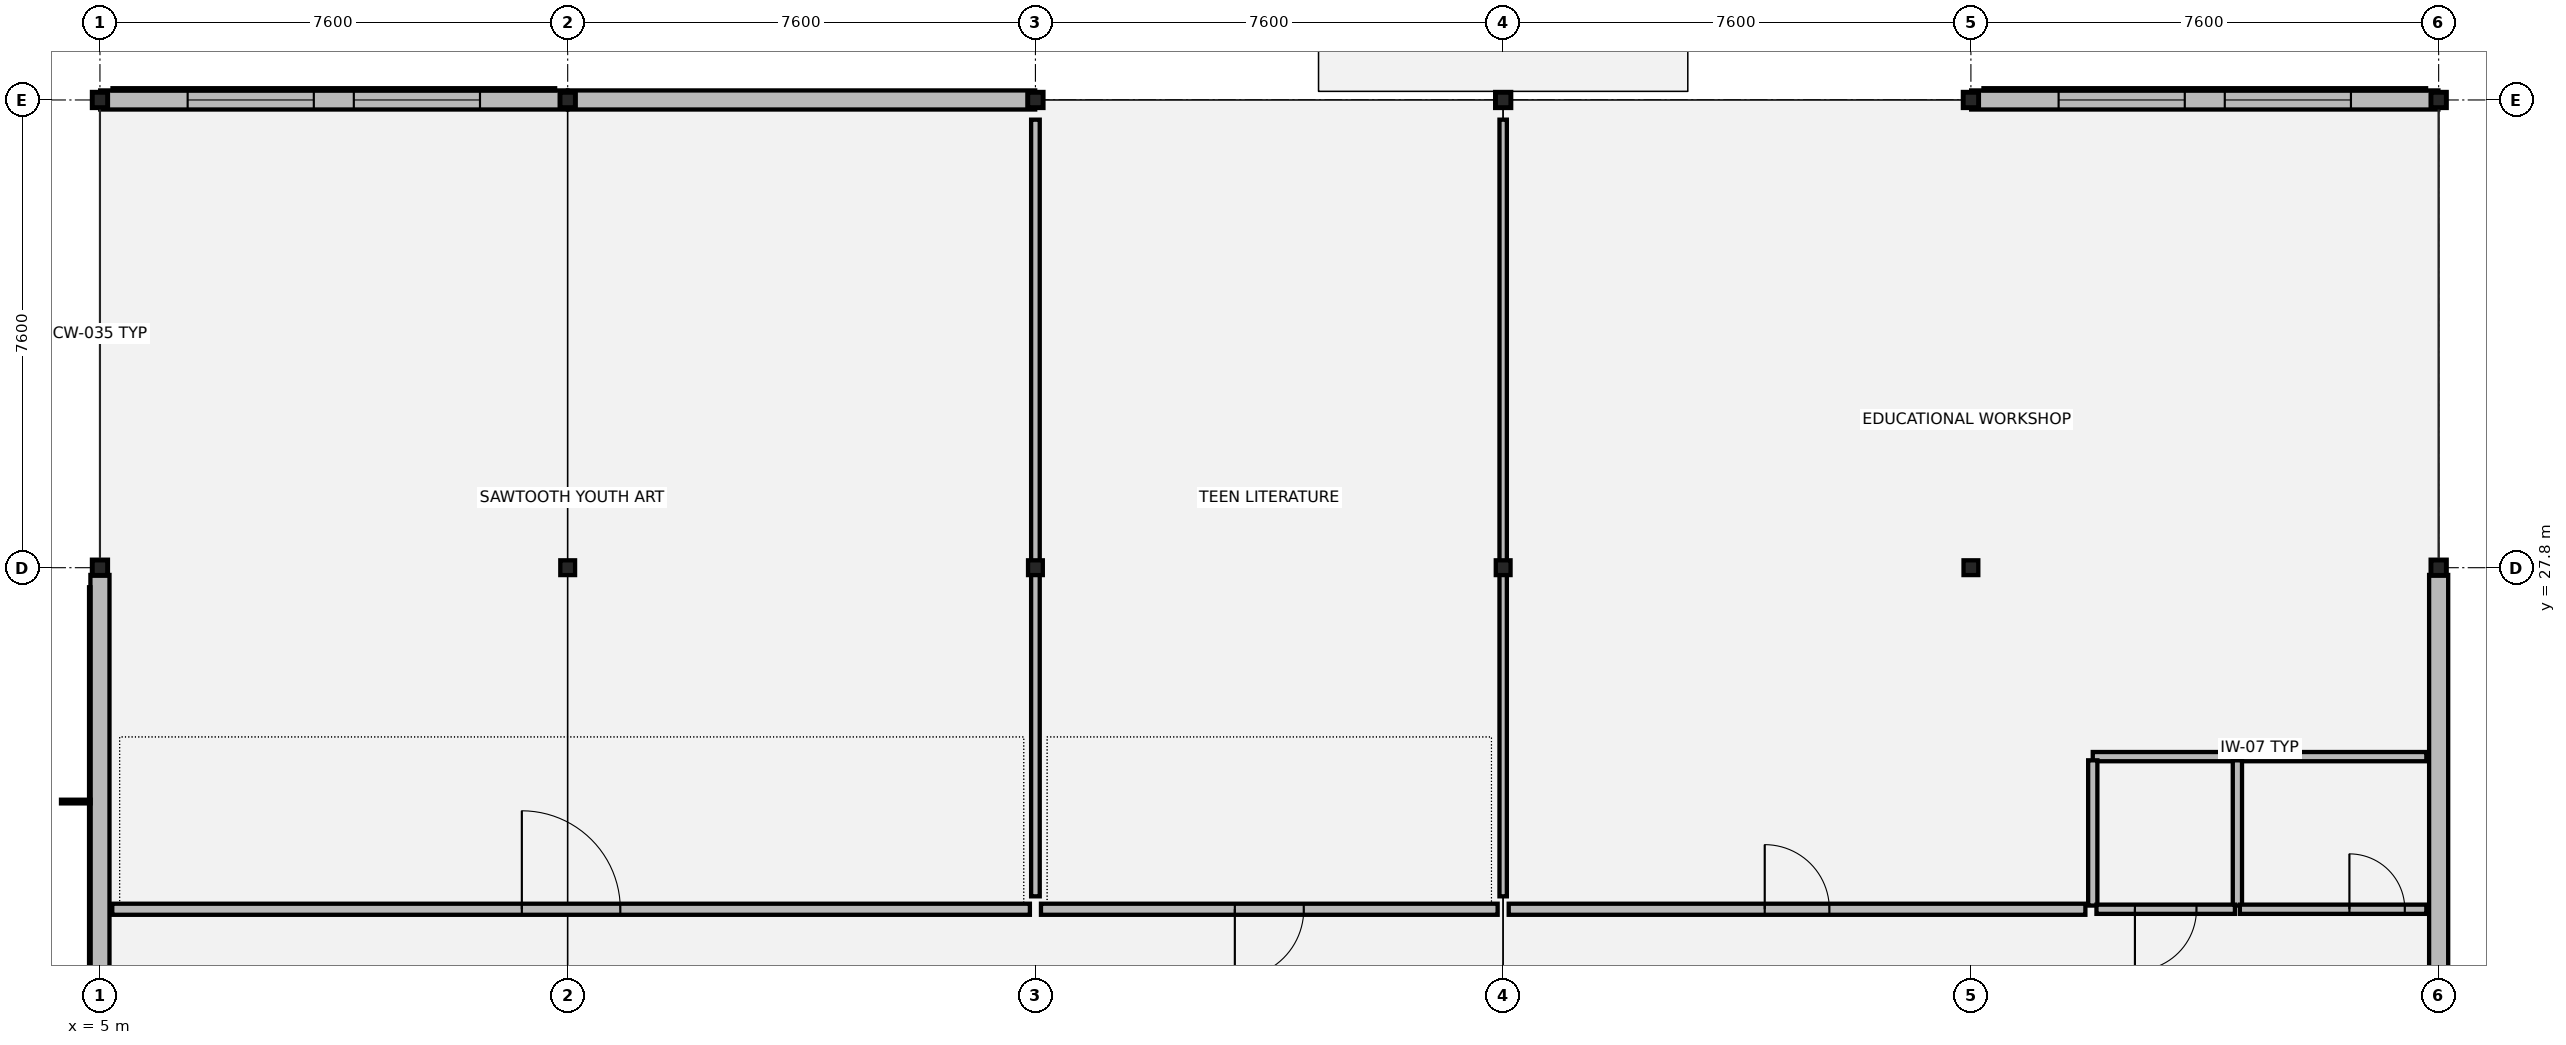
"""IFC4 building model, lengths in metres.
Left out: names, types, materials, properties, quantities, classifications, styles, units other than length and angle.
Written with IfcOpenShell. Run it as: python <this file> out.ifc"""

import sys

from ifc_helpers import new_model, si_unit, direction, frame, frame_2d, origin, origin_2d, place, context, subcontext, project, spatial, rectangle, i_section, extrude, element, fill, save


model = new_model("IFC4")
c1 = context("Model", 3, precision=1e-05, world=origin(), true_north=direction((0.0, 1.0)))
c2 = subcontext(c1, "Body", "Model", "MODEL_VIEW")
j1 = project(units=[si_unit("LENGTHUNIT", "METRE"), si_unit("PLANEANGLEUNIT", "RADIAN")], contexts=[c1])
p1 = place(None, origin())
s1 = spatial("IfcSite", under=j1, at=p1, CompositionType="ELEMENT")
p2 = place(p1, origin())
s2 = spatial("IfcBuilding", under=s1, at=p2, CompositionType="ELEMENT")
p3 = place(p2, frame((0.0, 0.0, 9.18)))
s3 = spatial("IfcBuildingStorey", under=s2, at=p3, CompositionType="ELEMENT", Elevation=9.18)
for number, where, z_axis, x_axis in (
    (1, (5.0, 27.8, 0.0), (0.0, 0.0, 1.0), (1.0, 0.0, 0.0)),
    (2, (5.0, 35.4, 0.0), (0.0, 0.0, 1.0), (1.0, 0.0, 0.0)),
    (3, (12.6, 27.8, 0.0), (0.0, 0.0, 1.0), (1.0, 0.0, 0.0)),
    (4, (12.6, 35.4, 0.0), (0.0, 0.0, 1.0), (1.0, 0.0, 0.0)),
    (5, (20.2, 27.8, 0.0), (0.0, 0.0, 1.0), (1.0, 0.0, 0.0)),
    (6, (20.2, 35.4, 0.0), (0.0, 0.0, 1.0), (1.0, 0.0, 0.0)),
    (7, (27.8, 27.8, 0.0), (0.0, 0.0, 1.0), (1.0, 0.0, 0.0)),
    (8, (27.8, 35.4, 0.0), (0.0, 0.0, 1.0), (1.0, 0.0, 0.0)),
    (9, (35.4, 27.8, 0.0), (0.0, 0.0, 1.0), (1.0, 0.0, 0.0)),
    (10, (35.4, 35.4, 0.0), (0.0, 0.0, 1.0), (1.0, 0.0, 0.0)),
    (11, (43.0, 27.8, 0.0), (0.0, 0.0, 1.0), (1.0, 0.0, 0.0)),
    (12, (43.0, 35.4, 0.0), (0.0, 0.0, 1.0), (1.0, 0.0, 0.0)),
):
    element("IfcColumn", number, at=place(p3, frame(where, z_axis=z_axis, x_axis=x_axis)), inside=s3, PredefinedType="COLUMN", context=c2, shape_type="SweptSolid", body=[
        extrude(i_section(OverallWidth=0.24, OverallDepth=0.24, WebThickness=0.01, FlangeThickness=0.017, at=origin_2d()), origin(), (0.0, 0.0, 1.0), 4.04),
    ])
p4 = place(p3, frame((43.0, 20.318, 0.0), z_axis=(0.0, 0.0, 1.0), x_axis=(0.0, 1.0, 0.0)))
e13 = element("IfcWall", 13, at=p4, inside=s3, PredefinedType="SOLIDWALL", context=c2, shape_type="SweptSolid", body=[
    extrude(rectangle(XDim=7.364, YDim=0.31, at=frame_2d((3.682, 0.0))), origin(), (0.0, 0.0, 1.0), 3.48),
])
p5 = place(p3, frame((42.996, 35.4, 0.0), z_axis=(0.0, 0.0, 1.0), x_axis=(-1.0, 0.0, 0.0)))
e14 = element("IfcWall", 14, at=p5, inside=s3, PredefinedType="SOLIDWALL", context=c2, shape_type="SweptSolid", body=[
    extrude(rectangle(XDim=7.592, YDim=0.31, at=frame_2d((3.796, 0.0))), origin(), (0.0, 0.0, 1.0), 3.48),
])
p6 = place(p5, frame((1.421, 0.0, 0.8)))
e15 = element("IfcOpeningElement", 15, at=p6, cuts=e14, PredefinedType="OPENING", context=c2, shape_type="SweptSolid", body=[
    extrude(rectangle(XDim=2.05, YDim=2.18, at=frame_2d((1.025, 1.09))), frame((0.0, 0.165, 0.0), z_axis=(0.0, -1.0, 0.0), x_axis=(1.0, 0.0, 0.0)), (0.0, 0.0, 1.0), 0.33),
])
p7 = place(p5, frame((4.121, 0.0, 0.8)))
e16 = element("IfcOpeningElement", 16, at=p7, cuts=e14, PredefinedType="OPENING", context=c2, shape_type="SweptSolid", body=[
    extrude(rectangle(XDim=2.05, YDim=2.18, at=frame_2d((1.025, 1.09))), frame((0.0, 0.165, 0.0), z_axis=(0.0, -1.0, 0.0), x_axis=(1.0, 0.0, 0.0)), (0.0, 0.0, 1.0), 0.33),
])
p8 = place(p3, frame((20.196, 35.4, 0.0), z_axis=(0.0, 0.0, 1.0), x_axis=(-1.0, 0.0, 0.0)))
e17 = element("IfcWall", 17, at=p8, inside=s3, PredefinedType="SOLIDWALL", context=c2, shape_type="SweptSolid", body=[
    extrude(rectangle(XDim=7.592, YDim=0.31, at=frame_2d((3.796, 0.0))), origin(), (0.0, 0.0, 1.0), 3.48),
])
p9 = place(p3, frame((12.596, 35.4, 0.0), z_axis=(0.0, 0.0, 1.0), x_axis=(-1.0, 0.0, 0.0)))
e18 = element("IfcWall", 18, at=p9, inside=s3, PredefinedType="SOLIDWALL", context=c2, shape_type="SweptSolid", body=[
    extrude(rectangle(XDim=7.592, YDim=0.31, at=frame_2d((3.796, 0.0))), origin(), (0.0, 0.0, 1.0), 3.48),
])
p10 = place(p9, frame((1.421, 0.0, 0.8)))
e19 = element("IfcOpeningElement", 19, at=p10, cuts=e18, PredefinedType="OPENING", context=c2, shape_type="SweptSolid", body=[
    extrude(rectangle(XDim=2.05, YDim=2.18, at=frame_2d((1.025, 1.09))), frame((0.0, 0.165, 0.0), z_axis=(0.0, -1.0, 0.0), x_axis=(1.0, 0.0, 0.0)), (0.0, 0.0, 1.0), 0.33),
])
p11 = place(p9, frame((4.121, 0.0, 0.8)))
e20 = element("IfcOpeningElement", 20, at=p11, cuts=e18, PredefinedType="OPENING", context=c2, shape_type="SweptSolid", body=[
    extrude(rectangle(XDim=2.05, YDim=2.18, at=frame_2d((1.025, 1.09))), frame((0.0, 0.165, 0.0), z_axis=(0.0, -1.0, 0.0), x_axis=(1.0, 0.0, 0.0)), (0.0, 0.0, 1.0), 0.33),
])
p12 = place(p3, frame((5.0, 27.682, 0.0), z_axis=(0.0, 0.0, 1.0), x_axis=(0.0, -1.0, 0.0)))
e21 = element("IfcWall", 21, at=p12, inside=s3, PredefinedType="SOLIDWALL", context=c2, shape_type="SweptSolid", body=[
    extrude(rectangle(XDim=7.364, YDim=0.31, at=frame_2d((3.682, 0.0))), origin(), (0.0, 0.0, 1.0), 3.48),
])
p13 = place(p3, frame((37.38, 24.73, 0.0), z_axis=(0.0, 0.0, 1.0), x_axis=(1.0, 0.0, 0.0)))
e22 = element("IfcWall", 22, at=p13, inside=s3, PredefinedType="PARTITIONING", context=c2, shape_type="SweptSolid", body=[
    extrude(rectangle(XDim=5.42, YDim=0.15, at=frame_2d((2.71, 0.0))), origin(), (0.0, 0.0, 1.0), 3.18),
])
for number, where, z_axis, x_axis in (
    (23, (37.38, 22.31, 0.0), (0.0, 0.0, 1.0), (0.0, 1.0, 0.0)),
    (24, (39.73, 22.31, 0.0), (0.0, 0.0, 1.0), (0.0, 1.0, 0.0)),
):
    element("IfcWall", number, at=place(p3, frame(where, z_axis=z_axis, x_axis=x_axis)), inside=s3, PredefinedType="PARTITIONING", context=c2, shape_type="SweptSolid", body=[
        extrude(rectangle(XDim=2.36, YDim=0.15, at=frame_2d((1.18, 0.0))), origin(), (0.0, 0.0, 1.0), 3.18),
    ])
p14 = place(p3, frame((37.44, 22.25, 0.0), z_axis=(0.0, 0.0, 1.0), x_axis=(1.0, 0.0, 0.0)))
e25 = element("IfcWall", 25, at=p14, inside=s3, PredefinedType="PARTITIONING", context=c2, shape_type="SweptSolid", body=[
    extrude(rectangle(XDim=2.25, YDim=0.15, at=frame_2d((1.125, 0.0))), origin(), (0.0, 0.0, 1.0), 3.18),
])
p15 = place(p14, frame((0.625, 0.0, 0.0)))
e26 = element("IfcOpeningElement", 26, at=p15, cuts=e25, PredefinedType="OPENING", context=c2, shape_type="SweptSolid", body=[
    extrude(rectangle(XDim=1.0, YDim=2.15, at=frame_2d((0.5, 1.075))), frame((0.0, 0.085, 0.0), z_axis=(0.0, -1.0, 0.0), x_axis=(1.0, 0.0, 0.0)), (0.0, 0.0, 1.0), 0.17),
])
p16 = place(p3, frame((39.77, 22.25, 0.0), z_axis=(0.0, 0.0, 1.0), x_axis=(1.0, 0.0, 0.0)))
e27 = element("IfcWall", 27, at=p16, inside=s3, PredefinedType="PARTITIONING", context=c2, shape_type="SweptSolid", body=[
    extrude(rectangle(XDim=3.03, YDim=0.15, at=frame_2d((1.515, 0.0))), origin(), (0.0, 0.0, 1.0), 3.18),
])
p17 = place(p16, frame((1.78, 0.0, 0.0)))
e28 = element("IfcOpeningElement", 28, at=p17, cuts=e27, PredefinedType="OPENING", context=c2, shape_type="SweptSolid", body=[
    extrude(rectangle(XDim=0.9, YDim=2.15, at=frame_2d((0.45, 1.075))), frame((0.0, 0.085, 0.0), z_axis=(0.0, -1.0, 0.0), x_axis=(1.0, 0.0, 0.0)), (0.0, 0.0, 1.0), 0.17),
])
p18 = place(p3, frame((5.2, 22.25, 0.0), z_axis=(0.0, 0.0, 1.0), x_axis=(1.0, 0.0, 0.0)))
e29 = element("IfcWall", 29, at=p18, inside=s3, PredefinedType="PARTITIONING", context=c2, shape_type="SweptSolid", body=[
    extrude(rectangle(XDim=14.91, YDim=0.18, at=frame_2d((7.455, 0.0))), origin(), (0.0, 0.0, 1.0), 3.18),
])
p19 = place(p18, frame((6.655, 0.0, 0.0)))
e30 = element("IfcOpeningElement", 30, at=p19, cuts=e29, PredefinedType="OPENING", context=c2, shape_type="SweptSolid", body=[
    extrude(rectangle(XDim=1.6, YDim=2.25, at=frame_2d((0.8, 1.125))), frame((0.0, 0.1, 0.0), z_axis=(0.0, -1.0, 0.0), x_axis=(1.0, 0.0, 0.0)), (0.0, 0.0, 1.0), 0.2),
])
p20 = place(p3, frame((20.29, 22.25, 0.0), z_axis=(0.0, 0.0, 1.0), x_axis=(1.0, 0.0, 0.0)))
e31 = element("IfcWall", 31, at=p20, inside=s3, PredefinedType="PARTITIONING", context=c2, shape_type="SweptSolid", body=[
    extrude(rectangle(XDim=7.42, YDim=0.18, at=frame_2d((3.71, 0.0))), origin(), (0.0, 0.0, 1.0), 3.18),
])
p21 = place(p20, frame((3.15, 0.0, 0.0)))
e32 = element("IfcOpeningElement", 32, at=p21, cuts=e31, PredefinedType="OPENING", context=c2, shape_type="SweptSolid", body=[
    extrude(rectangle(XDim=1.12, YDim=2.15, at=frame_2d((0.56, 1.075))), frame((0.0, 0.1, 0.0), z_axis=(0.0, -1.0, 0.0), x_axis=(1.0, 0.0, 0.0)), (0.0, 0.0, 1.0), 0.2),
])
p22 = place(p3, frame((27.89, 22.25, 0.0), z_axis=(0.0, 0.0, 1.0), x_axis=(1.0, 0.0, 0.0)))
e33 = element("IfcWall", 33, at=p22, inside=s3, PredefinedType="PARTITIONING", context=c2, shape_type="SweptSolid", body=[
    extrude(rectangle(XDim=9.37, YDim=0.18, at=frame_2d((4.685, 0.0))), origin(), (0.0, 0.0, 1.0), 3.18),
])
p23 = place(p22, frame((4.16, 0.0, 0.0)))
e34 = element("IfcOpeningElement", 34, at=p23, cuts=e33, PredefinedType="OPENING", context=c2, shape_type="SweptSolid", body=[
    extrude(rectangle(XDim=1.05, YDim=2.15, at=frame_2d((0.525, 1.075))), frame((0.0, 0.1, 0.0), z_axis=(0.0, -1.0, 0.0), x_axis=(1.0, 0.0, 0.0)), (0.0, 0.0, 1.0), 0.2),
])
p24 = place(p3, frame((20.2, 22.46, 0.0), z_axis=(0.0, 0.0, 1.0), x_axis=(0.0, 1.0, 0.0)))
e35 = element("IfcWall", 35, at=p24, inside=s3, PredefinedType="PARTITIONING", context=c2, shape_type="SweptSolid", body=[
    extrude(rectangle(XDim=12.62, YDim=0.14, at=frame_2d((6.31, 0.0))), origin(), (0.0, 0.0, 1.0), 3.18),
])
p25 = place(p3, frame((27.8, 22.46, 0.0), z_axis=(0.0, 0.0, 1.0), x_axis=(0.0, 1.0, 0.0)))
e36 = element("IfcWall", 36, at=p25, inside=s3, PredefinedType="PARTITIONING", context=c2, shape_type="SweptSolid", body=[
    extrude(rectangle(XDim=12.62, YDim=0.12, at=frame_2d((6.31, 0.0))), origin(), (0.0, 0.0, 1.0), 3.18),
])
p26 = place(p6, origin())
e37 = element("IfcWindow", 37, at=p26, inside=s3, PartitioningType="SINGLE_PANEL", PredefinedType="WINDOW", context=c2, shape_type="SweptSolid", body=[
    extrude(rectangle(XDim=2.05, YDim=2.18, at=frame_2d((1.025, 1.09))), frame((0.0, 0.03, 0.0), z_axis=(0.0, -1.0, 0.0), x_axis=(1.0, 0.0, 0.0)), (0.0, 0.0, 1.0), 0.06),
])
fill(e15, e37)
p27 = place(p7, origin())
e38 = element("IfcWindow", 38, at=p27, inside=s3, PartitioningType="SINGLE_PANEL", PredefinedType="WINDOW", context=c2, shape_type="SweptSolid", body=[
    extrude(rectangle(XDim=2.05, YDim=2.18, at=frame_2d((1.025, 1.09))), frame((0.0, 0.03, 0.0), z_axis=(0.0, -1.0, 0.0), x_axis=(1.0, 0.0, 0.0)), (0.0, 0.0, 1.0), 0.06),
])
fill(e16, e38)
p28 = place(p10, origin())
e39 = element("IfcWindow", 39, at=p28, inside=s3, PartitioningType="SINGLE_PANEL", PredefinedType="WINDOW", context=c2, shape_type="SweptSolid", body=[
    extrude(rectangle(XDim=2.05, YDim=2.18, at=frame_2d((1.025, 1.09))), frame((0.0, 0.03, 0.0), z_axis=(0.0, -1.0, 0.0), x_axis=(1.0, 0.0, 0.0)), (0.0, 0.0, 1.0), 0.06),
])
fill(e19, e39)
p29 = place(p11, origin())
e40 = element("IfcWindow", 40, at=p29, inside=s3, PartitioningType="SINGLE_PANEL", PredefinedType="WINDOW", context=c2, shape_type="SweptSolid", body=[
    extrude(rectangle(XDim=2.05, YDim=2.18, at=frame_2d((1.025, 1.09))), frame((0.0, 0.03, 0.0), z_axis=(0.0, -1.0, 0.0), x_axis=(1.0, 0.0, 0.0)), (0.0, 0.0, 1.0), 0.06),
])
fill(e20, e40)
p30 = place(p15, origin())
e41 = element("IfcDoor", 41, at=p30, inside=s3, OperationType="SINGLE_SWING_RIGHT", PredefinedType="DOOR", context=c2, shape_type="SweptSolid", body=[
    extrude(rectangle(XDim=1.0, YDim=2.15, at=frame_2d((0.5, 1.075))), frame((0.0, 0.025, 0.0), z_axis=(0.0, -1.0, 0.0), x_axis=(1.0, 0.0, 0.0)), (0.0, 0.0, 1.0), 0.05),
])
fill(e26, e41)
p31 = place(p17, origin())
e42 = element("IfcDoor", 42, at=p31, inside=s3, OperationType="SINGLE_SWING_LEFT", PredefinedType="DOOR", context=c2, shape_type="SweptSolid", body=[
    extrude(rectangle(XDim=0.9, YDim=2.15, at=frame_2d((0.45, 1.075))), frame((0.0, 0.025, 0.0), z_axis=(0.0, -1.0, 0.0), x_axis=(1.0, 0.0, 0.0)), (0.0, 0.0, 1.0), 0.05),
])
fill(e28, e42)
p32 = place(p19, origin())
e43 = element("IfcDoor", 43, at=p32, inside=s3, OperationType="DOUBLE_DOOR_SINGLE_SWING", PredefinedType="DOOR", context=c2, shape_type="SweptSolid", body=[
    extrude(rectangle(XDim=1.6, YDim=2.25, at=frame_2d((0.8, 1.125))), frame((0.0, 0.025, 0.0), z_axis=(0.0, -1.0, 0.0), x_axis=(1.0, 0.0, 0.0)), (0.0, 0.0, 1.0), 0.05),
])
fill(e30, e43)
p33 = place(p21, origin())
e44 = element("IfcDoor", 44, at=p33, inside=s3, OperationType="SINGLE_SWING_RIGHT", PredefinedType="DOOR", context=c2, shape_type="SweptSolid", body=[
    extrude(rectangle(XDim=1.12, YDim=2.15, at=frame_2d((0.56, 1.075))), frame((0.0, 0.025, 0.0), z_axis=(0.0, -1.0, 0.0), x_axis=(1.0, 0.0, 0.0)), (0.0, 0.0, 1.0), 0.05),
])
fill(e32, e44)
p34 = place(p23, origin())
e45 = element("IfcDoor", 45, at=p34, inside=s3, OperationType="SINGLE_SWING_LEFT", PredefinedType="DOOR", context=c2, shape_type="SweptSolid", body=[
    extrude(rectangle(XDim=1.05, YDim=2.15, at=frame_2d((0.525, 1.075))), frame((0.0, 0.025, 0.0), z_axis=(0.0, -1.0, 0.0), x_axis=(1.0, 0.0, 0.0)), (0.0, 0.0, 1.0), 0.05),
])
fill(e34, e45)
save(model, sys.argv[1])
